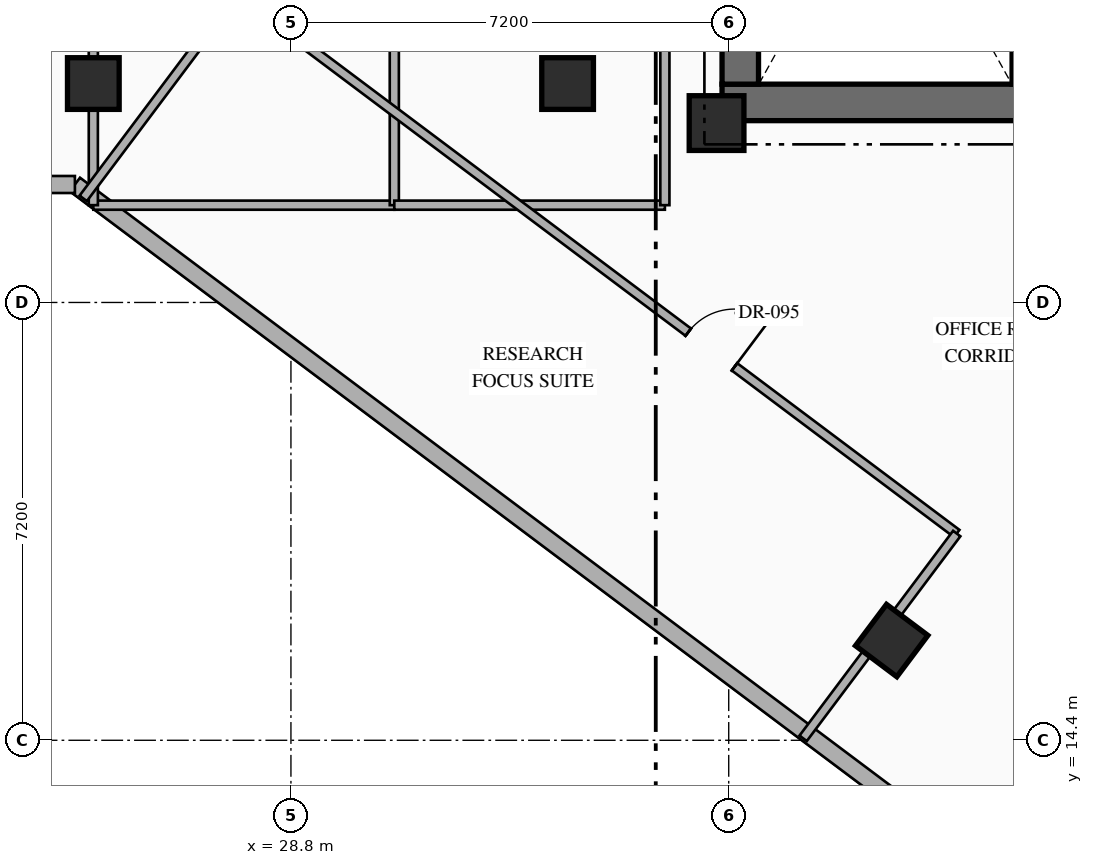
"""IFC4 building model, lengths in metres.
Left out: names, types, materials, properties, quantities, classifications, styles, units other than length and angle.
Written with IfcOpenShell. Run it as: python <this file> out.ifc"""

import sys

from ifc_helpers import new_model, si_unit, direction, frame, frame_2d, origin, origin_2d, place, context, subcontext, project, spatial, rectangle, hollow_rectangle, extrude, element, fill, save


model = new_model("IFC4")
c1 = context("Model", 3, precision=1e-05, world=origin(), true_north=direction((0.0, 1.0)))
c2 = subcontext(c1, "Body", "Model", "MODEL_VIEW")
j1 = project(units=[si_unit("LENGTHUNIT", "METRE"), si_unit("PLANEANGLEUNIT", "RADIAN")], contexts=[c1])
p1 = place(None, origin())
s1 = spatial("IfcSite", under=j1, at=p1, CompositionType="ELEMENT")
p2 = place(p1, origin())
s2 = spatial("IfcBuilding", under=s1, at=p2, CompositionType="ELEMENT")
p3 = place(p2, frame((0.0, 0.0, 149.25)))
s3 = spatial("IfcBuildingStorey", under=s2, at=p3, CompositionType="ELEMENT", Elevation=149.25)
p4 = place(p3, frame((35.89, 24.89, 0.0), z_axis=(0.0, 0.0, 1.0), x_axis=(1.0, 0.0, 0.0)))
e1 = element("IfcWall", 1, at=p4, inside=s3, PredefinedType="SHEAR", context=c2, shape_type="SweptSolid", body=[
    extrude(rectangle(XDim=7.76, YDim=0.6, at=frame_2d((3.88, 0.0))), origin(), (0.0, 0.0, 1.0), 3.6),
])
p5 = place(p3, frame((36.19, 25.19, 0.0), z_axis=(0.0, 0.0, 1.0), x_axis=(0.0, 1.0, 0.0)))
e2 = element("IfcWall", 2, at=p5, inside=s3, PredefinedType="SHEAR", context=c2, shape_type="SweptSolid", body=[
    extrude(rectangle(XDim=9.48, YDim=0.6, at=frame_2d((4.74, 0.0))), origin(), (0.0, 0.0, 1.0), 3.6),
])
p6 = place(p3, frame((40.81, 25.19, 0.0), z_axis=(0.0, 0.0, 1.0), x_axis=(0.0, 1.0, 0.0)))
e3 = element("IfcWall", 3, at=p6, inside=s3, PredefinedType="SHEAR", context=c2, shape_type="SweptSolid", body=[
    extrude(rectangle(XDim=9.48, YDim=0.3, at=frame_2d((4.74, 0.0))), origin(), (0.0, 0.0, 1.0), 3.6),
])
p7 = place(p3, frame((35.8, 24.55, 0.0), z_axis=(0.0, 0.0, 1.0), x_axis=(1.0, 0.0, 0.0)))
e4 = element("IfcColumn", 4, at=p7, inside=s3, PredefinedType="COLUMN", context=c2, shape_type="SweptSolid", body=[
    extrude(rectangle(XDim=0.9, YDim=0.9, at=origin_2d()), origin(), (0.0, 0.0, 1.0), 3.6),
])
for number, where, z_axis, x_axis in (
    (5, (25.55, 25.2, 0.0), (0.0, 0.0, 1.0), (1.0, 0.0, 0.0)),
    (6, (33.35, 25.2, 0.0), (0.0, 0.0, 1.0), (1.0, 0.0, 0.0)),
    (7, (38.68, 16.04, 0.0), (0.0, 0.0, 1.0), (0.8, -0.6, 0.0)),
):
    element("IfcColumn", number, at=place(p3, frame(where, z_axis=z_axis, x_axis=x_axis)), inside=s3, PredefinedType="COLUMN", context=c2, shape_type="SweptSolid", body=[
        extrude(hollow_rectangle(XDim=0.85, YDim=0.85, WallThickness=0.032, at=origin_2d()), origin(), (0.0, 0.0, 1.0), 3.6),
    ])
p8 = place(p3, frame((44.918, 8.787, 0.0), z_axis=(0.0, 0.0, 1.0), x_axis=(-0.800004765927, 0.599993645378, 0.0)))
e8 = element("IfcWall", 8, at=p8, inside=s3, PredefinedType="STANDARD", context=c2, shape_type="SweptSolid", body=[
    extrude(rectangle(XDim=24.588, YDim=0.28, at=frame_2d((12.294, 0.0))), origin(), (0.0, 0.0, 1.0), 3.35),
])
p9 = place(p3, frame((25.247, 23.54, 0.0), z_axis=(0.0, 0.0, 1.0), x_axis=(-1.0, 0.0, 0.0)))
e9 = element("IfcWall", 9, at=p9, inside=s3, PredefinedType="STANDARD", context=c2, shape_type="SweptSolid", body=[
    extrude(rectangle(XDim=6.747, YDim=0.28, at=frame_2d((3.374, 0.0))), origin(), (0.0, 0.0, 1.0), 3.35),
])
p10 = place(p3, frame((25.55, 23.2, 0.0), z_axis=(0.0, 0.0, 1.0), x_axis=(1.0, 0.0, 0.0)))
e10 = element("IfcWall", 10, at=p10, inside=s3, PredefinedType="PARTITIONING", context=c2, shape_type="SweptSolid", body=[
    extrude(rectangle(XDim=4.95, YDim=0.15, at=frame_2d((2.475, 0.0))), origin(), (0.0, 0.0, 1.0), 3.35),
])
p11 = place(p3, frame((25.55, 23.2, 0.0), z_axis=(0.0, 0.0, 1.0), x_axis=(0.0, 1.0, 0.0)))
e11 = element("IfcWall", 11, at=p11, inside=s3, PredefinedType="PARTITIONING", context=c2, shape_type="SweptSolid", body=[
    extrude(rectangle(XDim=7.15, YDim=0.15, at=frame_2d((3.575, 0.0))), origin(), (0.0, 0.0, 1.0), 2.695),
])
p12 = place(p3, frame((30.5, 23.2, 0.0), z_axis=(0.0, 0.0, 1.0), x_axis=(0.0, 1.0, 0.0)))
e12 = element("IfcWall", 12, at=p12, inside=s3, PredefinedType="PARTITIONING", context=c2, shape_type="SweptSolid", body=[
    extrude(rectangle(XDim=7.15, YDim=0.15, at=frame_2d((3.575, 0.0))), origin(), (0.0, 0.0, 1.0), 3.35),
])
p13 = place(p3, frame((30.5, 23.2, 0.0), z_axis=(0.0, 0.0, 1.0), x_axis=(1.0, 0.0, 0.0)))
e13 = element("IfcWall", 13, at=p13, inside=s3, PredefinedType="PARTITIONING", context=c2, shape_type="SweptSolid", body=[
    extrude(rectangle(XDim=4.45, YDim=0.15, at=frame_2d((2.225, 0.0))), origin(), (0.0, 0.0, 1.0), 3.35),
])
p14 = place(p3, frame((34.95, 23.2, 0.0), z_axis=(0.0, 0.0, 1.0), x_axis=(0.0, 1.0, 0.0)))
e14 = element("IfcWall", 14, at=p14, inside=s3, PredefinedType="PARTITIONING", context=c2, shape_type="SweptSolid", body=[
    extrude(rectangle(XDim=7.15, YDim=0.15, at=frame_2d((3.575, 0.0))), origin(), (0.0, 0.0, 1.0), 3.35),
])
p15 = place(p3, frame((27.91, 26.68, 0.0), z_axis=(0.0, 0.0, 1.0), x_axis=(0.800005938517, -0.599992081896, 0.0)))
e15 = element("IfcWall", 15, at=p15, inside=s3, PredefinedType="PARTITIONING", context=c2, shape_type="SweptSolid", body=[
    extrude(rectangle(XDim=14.8, YDim=0.15, at=frame_2d((7.4, 0.0))), origin(), (0.0, 0.0, 1.0), 3.35),
])
p16 = place(p15, frame((9.281, 0.0, 0.0)))
e16 = element("IfcOpeningElement", 16, at=p16, cuts=e15, PredefinedType="OPENING", context=c2, shape_type="SweptSolid", body=[
    extrude(rectangle(XDim=0.95, YDim=2.15, at=frame_2d((0.475, 1.075))), frame((0.0, 0.085, 0.0), z_axis=(0.0, -1.0, 0.0), x_axis=(1.0, 0.0, 0.0)), (0.0, 0.0, 1.0), 0.17),
])
p17 = place(p3, frame((25.384, 23.312, 0.0), z_axis=(0.0, 0.0, 1.0), x_axis=(0.599990721155, 0.80000695905, 0.0)))
e17 = element("IfcWall", 17, at=p17, inside=s3, PredefinedType="PARTITIONING", context=c2, shape_type="SweptSolid", body=[
    extrude(rectangle(XDim=4.21, YDim=0.15, at=frame_2d((2.105, 0.0))), origin(), (0.0, 0.0, 1.0), 3.35),
])
p18 = place(p3, frame((37.224, 14.432, 0.0), z_axis=(0.0, 0.0, 1.0), x_axis=(0.599962885857, 0.800027834262, 0.0)))
e18 = element("IfcWall", 18, at=p18, inside=s3, PredefinedType="PARTITIONING", context=c2, shape_type="SweptSolid", body=[
    extrude(rectangle(XDim=4.21, YDim=0.15, at=frame_2d((2.105, 0.0))), origin(), (0.0, 0.0, 1.0), 2.695),
])
p19 = place(p16, origin())
e19 = element("IfcDoor", 19, at=p19, inside=s3, OperationType="SINGLE_SWING_RIGHT", PredefinedType="DOOR", context=c2, shape_type="SweptSolid", body=[
    extrude(rectangle(XDim=0.95, YDim=2.15, at=frame_2d((0.475, 1.075))), frame((0.0, 0.025, 0.0), z_axis=(0.0, -1.0, 0.0), x_axis=(1.0, 0.0, 0.0)), (0.0, 0.0, 1.0), 0.05),
])
fill(e16, e19)
save(model, sys.argv[1])
